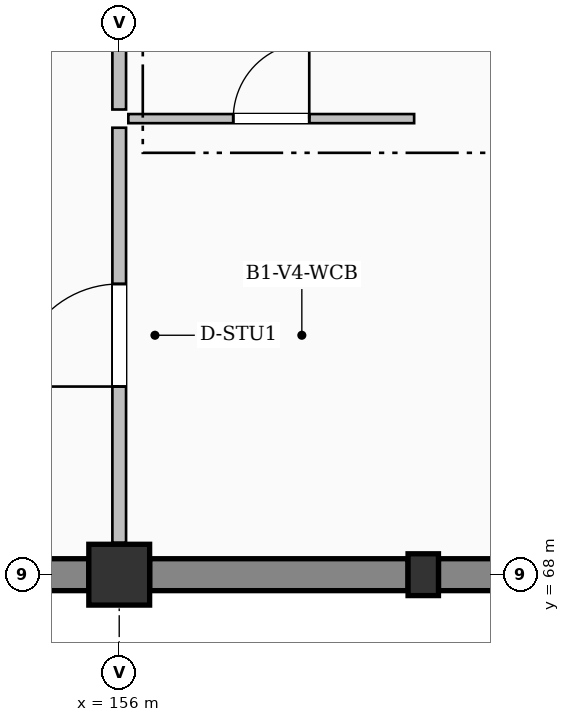
"""IFC4 building model, lengths in metres.
Left out: names, types, materials, properties, quantities, classifications, styles, units other than length and angle.
Written with IfcOpenShell. Run it as: python <this file> out.ifc"""

import sys

from ifc_helpers import new_model, si_unit, direction, frame, frame_2d, origin, origin_2d, place, context, subcontext, project, spatial, rectangle, extrude, element, fill, save


model = new_model("IFC4")
c1 = context("Model", 3, precision=1e-05, world=origin(), true_north=direction((0.0, 1.0)))
c2 = subcontext(c1, "Body", "Model", "MODEL_VIEW")
j1 = project(units=[si_unit("LENGTHUNIT", "METRE"), si_unit("PLANEANGLEUNIT", "RADIAN")], contexts=[c1])
p1 = place(None, origin())
s1 = spatial("IfcSite", under=j1, at=p1, CompositionType="ELEMENT")
p2 = place(p1, origin())
s2 = spatial("IfcBuilding", under=s1, at=p2, CompositionType="ELEMENT")
p3 = place(p2, frame((0.0, 0.0, -4.8)))
s3 = spatial("IfcBuildingStorey", under=s2, at=p3, CompositionType="ELEMENT", Elevation=-4.8)
p4 = place(p3, frame((156.0, 68.0, -0.38), z_axis=(0.0, 0.0, 1.0), x_axis=(1.0, 0.0, 0.0)))
e1 = element("IfcColumn", 1, at=p4, inside=s3, PredefinedType="COLUMN", context=c2, shape_type="SweptSolid", body=[
    extrude(rectangle(XDim=0.8, YDim=0.8, at=origin_2d()), origin(), (0.0, 0.0, 1.0), 5.18),
])
p5 = place(p3, frame((160.0, 68.0, -0.38), z_axis=(0.0, 0.0, 1.0), x_axis=(1.0, 0.0, 0.0)))
e2 = element("IfcColumn", 2, at=p5, inside=s3, PredefinedType="PILASTER", context=c2, shape_type="SweptSolid", body=[
    extrude(rectangle(XDim=0.4, YDim=0.55, at=origin_2d()), origin(), (0.0, 0.0, 1.0), 5.18),
])
p6 = place(p3, frame((163.7, 68.0, 0.0), z_axis=(0.0, 0.0, 1.0), x_axis=(-1.0, 0.0, 0.0)))
e3 = element("IfcWall", 3, at=p6, inside=s3, PredefinedType="USERDEFINED", context=c2, shape_type="SweptSolid", body=[
    extrude(rectangle(XDim=3.5, YDim=0.42, at=frame_2d((1.75, 0.0))), origin(), (0.0, 0.0, 1.0), 3.85),
])
p7 = place(p3, frame((159.8, 68.0, 0.0), z_axis=(0.0, 0.0, 1.0), x_axis=(-1.0, 0.0, 0.0)))
e4 = element("IfcWall", 4, at=p7, inside=s3, PredefinedType="USERDEFINED", context=c2, shape_type="SweptSolid", body=[
    extrude(rectangle(XDim=3.4, YDim=0.42, at=frame_2d((1.7, 0.0))), origin(), (0.0, 0.0, 1.0), 3.85),
])
p8 = place(p3, frame((155.6, 68.0, 0.0), z_axis=(0.0, 0.0, 1.0), x_axis=(-1.0, 0.0, 0.0)))
e5 = element("IfcWall", 5, at=p8, inside=s3, PredefinedType="USERDEFINED", context=c2, shape_type="SweptSolid", body=[
    extrude(rectangle(XDim=3.375, YDim=0.42, at=frame_2d((1.688, 0.0))), origin(), (0.0, 0.0, 1.0), 3.85),
])
p9 = place(p3, frame((156.0, 68.42, 0.0), z_axis=(0.0, 0.0, 1.0), x_axis=(0.0, 1.0, 0.0)))
e6 = element("IfcWall", 6, at=p9, inside=s3, PredefinedType="PARTITIONING", context=c2, shape_type="SweptSolid", body=[
    extrude(rectangle(XDim=5.46, YDim=0.18, at=frame_2d((2.73, 0.0))), origin(), (0.0, 0.0, 1.0), 4.095),
])
p10 = place(p9, frame((2.055, 0.0, 0.0)))
e7 = element("IfcOpeningElement", 7, at=p10, cuts=e6, PredefinedType="OPENING", context=c2, shape_type="SweptSolid", body=[
    extrude(rectangle(XDim=1.35, YDim=2.2, at=frame_2d((0.675, 1.1))), frame((0.0, 0.1, 0.0), z_axis=(0.0, -1.0, 0.0), x_axis=(1.0, 0.0, 0.0)), (0.0, 0.0, 1.0), 0.2),
])
p11 = place(p3, frame((156.0, 74.12, 0.0), z_axis=(0.0, 0.0, 1.0), x_axis=(0.0, 1.0, 0.0)))
e8 = element("IfcWall", 8, at=p11, inside=s3, PredefinedType="PARTITIONING", context=c2, shape_type="SweptSolid", body=[
    extrude(rectangle(XDim=1.46, YDim=0.18, at=frame_2d((0.73, 0.0))), origin(), (0.0, 0.0, 1.0), 4.095),
])
p12 = place(p3, frame((156.12, 74.0, 0.0), z_axis=(0.0, 0.0, 1.0), x_axis=(1.0, 0.0, 0.0)))
e9 = element("IfcWall", 9, at=p12, inside=s3, PredefinedType="PARTITIONING", context=c2, shape_type="SweptSolid", body=[
    extrude(rectangle(XDim=3.76, YDim=0.12, at=frame_2d((1.88, 0.0))), origin(), (0.0, 0.0, 1.0), 4.5),
])
p13 = place(p12, frame((1.38, 0.0, 0.0)))
e10 = element("IfcOpeningElement", 10, at=p13, cuts=e9, PredefinedType="OPENING", context=c2, shape_type="SweptSolid", body=[
    extrude(rectangle(XDim=1.0, YDim=2.1, at=frame_2d((0.5, 1.05))), frame((0.0, 0.07, 0.0), z_axis=(0.0, -1.0, 0.0), x_axis=(1.0, 0.0, 0.0)), (0.0, 0.0, 1.0), 0.14),
])
p14 = place(p10, origin())
e11 = element("IfcDoor", 11, at=p14, inside=s3, OperationType="SINGLE_SWING_LEFT", PredefinedType="DOOR", context=c2, shape_type="SweptSolid", body=[
    extrude(rectangle(XDim=1.35, YDim=2.2, at=frame_2d((0.675, 1.1))), frame((0.0, 0.025, 0.0), z_axis=(0.0, -1.0, 0.0), x_axis=(1.0, 0.0, 0.0)), (0.0, 0.0, 1.0), 0.05),
])
fill(e7, e11)
p15 = place(p13, origin())
e12 = element("IfcDoor", 12, at=p15, inside=s3, OperationType="SINGLE_SWING_RIGHT", PredefinedType="DOOR", context=c2, shape_type="SweptSolid", body=[
    extrude(rectangle(XDim=1.0, YDim=2.1, at=frame_2d((0.5, 1.05))), frame((0.0, 0.025, 0.0), z_axis=(0.0, -1.0, 0.0), x_axis=(1.0, 0.0, 0.0)), (0.0, 0.0, 1.0), 0.05),
])
fill(e10, e12)
save(model, sys.argv[1])
